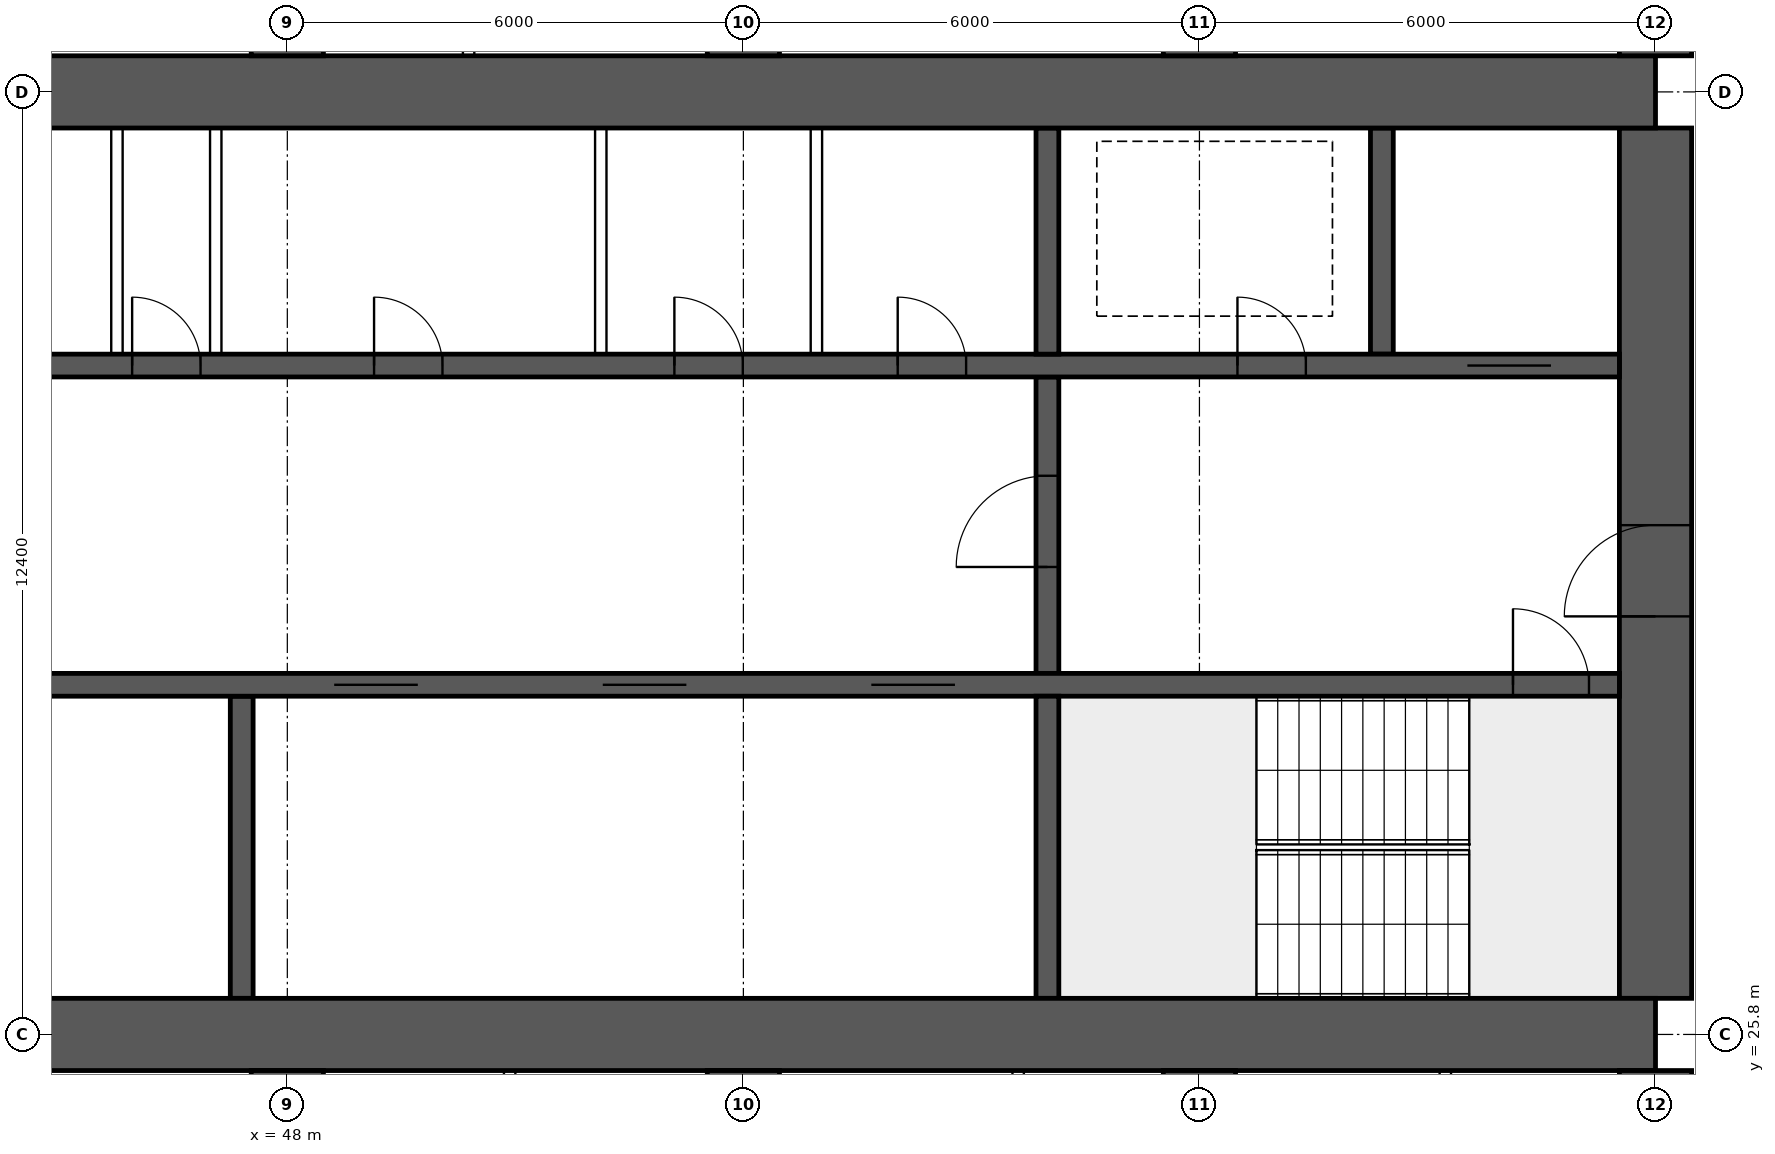
"""IFC4 building model, lengths in metres.
Left out: names, types, materials, properties, quantities, classifications, styles, units other than length and angle.
Written with IfcOpenShell. Run it as: python <this file> out.ifc"""

import sys

from ifc_helpers import new_model, si_unit, direction, frame, frame_2d, origin, place, context, subcontext, project, spatial, rectangle, extrude, element, fill, save


model = new_model("IFC4")
c1 = context("Model", 3, precision=1e-05, world=origin(), true_north=direction((0.0, 1.0)))
c2 = subcontext(c1, "Body", "Model", "MODEL_VIEW")
j1 = project(units=[si_unit("LENGTHUNIT", "METRE"), si_unit("PLANEANGLEUNIT", "RADIAN")], contexts=[c1])
p1 = place(None, origin())
s1 = spatial("IfcSite", under=j1, at=p1, CompositionType="ELEMENT")
p2 = place(p1, origin())
s2 = spatial("IfcBuilding", under=s1, at=p2, CompositionType="ELEMENT")
p3 = place(p2, frame((0.0, 0.0, 91.9)))
s3 = spatial("IfcBuildingStorey", under=s2, at=p3, CompositionType="ELEMENT", Elevation=91.9)
for number, where, z_axis, x_axis in (
    (1, (18.0, 25.8, 0.0), (0.0, 0.0, 1.0), (1.0, 0.0, 0.0)),
    (2, (18.0, 38.2, 0.0), (0.0, 0.0, 1.0), (1.0, 0.0, 0.0)),
):
    element("IfcWall", number, at=place(p3, frame(where, z_axis=z_axis, x_axis=x_axis)), inside=s3, PredefinedType="SHEAR", context=c2, shape_type="SweptSolid", body=[
        extrude(rectangle(XDim=48.0, YDim=0.95, at=frame_2d((24.0, 0.0))), origin(), (0.0, 0.0, 1.0), 3.75),
    ])
p4 = place(p3, frame((66.0, 26.275, 0.0), z_axis=(0.0, 0.0, 1.0), x_axis=(0.0, 1.0, 0.0)))
e3 = element("IfcWall", 3, at=p4, inside=s3, PredefinedType="SHEAR", context=c2, shape_type="SweptSolid", body=[
    extrude(rectangle(XDim=11.45, YDim=0.95, at=frame_2d((5.725, 0.0))), origin(), (0.0, 0.0, 1.0), 3.75),
])
p5 = place(p4, frame((5.025, 0.0, 0.0)))
e4 = element("IfcOpeningElement", 4, at=p5, cuts=e3, PredefinedType="OPENING", context=c2, shape_type="SweptSolid", body=[
    extrude(rectangle(XDim=1.2, YDim=2.1, at=frame_2d((0.6, 1.05))), frame((0.0, 0.485, 0.0), z_axis=(0.0, -1.0, 0.0), x_axis=(1.0, 0.0, 0.0)), (0.0, 0.0, 1.0), 0.97),
])
p6 = place(p3, frame((18.475, 30.4, 0.0), z_axis=(0.0, 0.0, 1.0), x_axis=(1.0, 0.0, 0.0)))
e5 = element("IfcWall", 5, at=p6, inside=s3, PredefinedType="SHEAR", context=c2, shape_type="SweptSolid", body=[
    extrude(rectangle(XDim=47.05, YDim=0.3, at=frame_2d((23.525, 0.0))), origin(), (0.0, 0.0, 1.0), 3.75),
])
p7 = place(p6, frame((0.4, 0.0, 0.0)))
e6 = element("IfcOpeningElement", 6, at=p7, cuts=e5, PredefinedType="OPENING", context=c2, shape_type="SweptSolid", body=[
    extrude(rectangle(XDim=1.0, YDim=2.1, at=frame_2d((0.5, 1.05))), frame((0.0, 0.16, 0.0), z_axis=(0.0, -1.0, 0.0), x_axis=(1.0, 0.0, 0.0)), (0.0, 0.0, 1.0), 0.32),
])
p8 = place(p6, frame((45.65, 0.0, 0.0)))
e7 = element("IfcOpeningElement", 7, at=p8, cuts=e5, PredefinedType="OPENING", context=c2, shape_type="SweptSolid", body=[
    extrude(rectangle(XDim=1.0, YDim=2.1, at=frame_2d((0.5, 1.05))), frame((0.0, 0.16, 0.0), z_axis=(0.0, -1.0, 0.0), x_axis=(1.0, 0.0, 0.0)), (0.0, 0.0, 1.0), 0.32),
])
p9 = place(p6, frame((8.275, 0.0, 0.0)))
e8 = element("IfcOpeningElement", 8, at=p9, cuts=e5, PredefinedType="OPENING", context=c2, shape_type="SweptSolid", body=[
    extrude(rectangle(XDim=1.1, YDim=2.1, at=frame_2d((0.55, 1.05))), frame((0.0, 0.16, 0.0), z_axis=(0.0, -1.0, 0.0), x_axis=(1.0, 0.0, 0.0)), (0.0, 0.0, 1.0), 0.32),
])
p10 = place(p6, frame((10.875, 0.0, 0.0)))
e9 = element("IfcOpeningElement", 9, at=p10, cuts=e5, PredefinedType="OPENING", context=c2, shape_type="SweptSolid", body=[
    extrude(rectangle(XDim=1.1, YDim=2.1, at=frame_2d((0.55, 1.05))), frame((0.0, 0.16, 0.0), z_axis=(0.0, -1.0, 0.0), x_axis=(1.0, 0.0, 0.0)), (0.0, 0.0, 1.0), 0.32),
])
p11 = place(p6, frame((13.475, 0.0, 0.0)))
e10 = element("IfcOpeningElement", 10, at=p11, cuts=e5, PredefinedType="OPENING", context=c2, shape_type="SweptSolid", body=[
    extrude(rectangle(XDim=1.1, YDim=2.1, at=frame_2d((0.55, 1.05))), frame((0.0, 0.16, 0.0), z_axis=(0.0, -1.0, 0.0), x_axis=(1.0, 0.0, 0.0)), (0.0, 0.0, 1.0), 0.32),
])
p12 = place(p6, frame((16.075, 0.0, 0.0)))
e11 = element("IfcOpeningElement", 11, at=p12, cuts=e5, PredefinedType="OPENING", context=c2, shape_type="SweptSolid", body=[
    extrude(rectangle(XDim=1.1, YDim=2.1, at=frame_2d((0.55, 1.05))), frame((0.0, 0.16, 0.0), z_axis=(0.0, -1.0, 0.0), x_axis=(1.0, 0.0, 0.0)), (0.0, 0.0, 1.0), 0.32),
])
p13 = place(p6, frame((18.85, 0.0, 0.0)))
e12 = element("IfcOpeningElement", 12, at=p13, cuts=e5, PredefinedType="OPENING", context=c2, shape_type="SweptSolid", body=[
    extrude(rectangle(XDim=0.9, YDim=2.1, at=frame_2d((0.45, 1.05))), frame((0.0, 0.16, 0.0), z_axis=(0.0, -1.0, 0.0), x_axis=(1.0, 0.0, 0.0)), (0.0, 0.0, 1.0), 0.32),
])
p14 = place(p6, frame((30.142, 0.0, 0.0)))
e13 = element("IfcOpeningElement", 13, at=p14, cuts=e5, PredefinedType="OPENING", context=c2, shape_type="SweptSolid", body=[
    extrude(rectangle(XDim=1.1, YDim=2.1, at=frame_2d((0.55, 1.05))), frame((0.0, 0.16, 0.0), z_axis=(0.0, -1.0, 0.0), x_axis=(1.0, 0.0, 0.0)), (0.0, 0.0, 1.0), 0.32),
])
p15 = place(p6, frame((33.675, 0.0, 0.0)))
e14 = element("IfcOpeningElement", 14, at=p15, cuts=e5, PredefinedType="OPENING", context=c2, shape_type="SweptSolid", body=[
    extrude(rectangle(XDim=1.1, YDim=2.1, at=frame_2d((0.55, 1.05))), frame((0.0, 0.16, 0.0), z_axis=(0.0, -1.0, 0.0), x_axis=(1.0, 0.0, 0.0)), (0.0, 0.0, 1.0), 0.32),
])
p16 = place(p6, frame((37.208, 0.0, 0.0)))
e15 = element("IfcOpeningElement", 15, at=p16, cuts=e5, PredefinedType="OPENING", context=c2, shape_type="SweptSolid", body=[
    extrude(rectangle(XDim=1.1, YDim=2.1, at=frame_2d((0.55, 1.05))), frame((0.0, 0.16, 0.0), z_axis=(0.0, -1.0, 0.0), x_axis=(1.0, 0.0, 0.0)), (0.0, 0.0, 1.0), 0.32),
])
p17 = place(p3, frame((18.475, 34.6, 0.0), z_axis=(0.0, 0.0, 1.0), x_axis=(1.0, 0.0, 0.0)))
e16 = element("IfcWall", 16, at=p17, inside=s3, PredefinedType="SHEAR", context=c2, shape_type="SweptSolid", body=[
    extrude(rectangle(XDim=47.05, YDim=0.3, at=frame_2d((23.525, 0.0))), origin(), (0.0, 0.0, 1.0), 3.75),
])
p18 = place(p17, frame((0.9, 0.0, 0.0)))
e17 = element("IfcOpeningElement", 17, at=p18, cuts=e16, PredefinedType="OPENING", context=c2, shape_type="SweptSolid", body=[
    extrude(rectangle(XDim=1.1, YDim=2.1, at=frame_2d((0.55, 1.05))), frame((0.0, 0.16, 0.0), z_axis=(0.0, -1.0, 0.0), x_axis=(1.0, 0.0, 0.0)), (0.0, 0.0, 1.0), 0.32),
])
p19 = place(p17, frame((45.05, 0.0, 0.0)))
e18 = element("IfcOpeningElement", 18, at=p19, cuts=e16, PredefinedType="OPENING", context=c2, shape_type="SweptSolid", body=[
    extrude(rectangle(XDim=1.1, YDim=2.1, at=frame_2d((0.55, 1.05))), frame((0.0, 0.16, 0.0), z_axis=(0.0, -1.0, 0.0), x_axis=(1.0, 0.0, 0.0)), (0.0, 0.0, 1.0), 0.32),
])
p20 = place(p17, frame((4.125, 0.0, 0.0)))
e19 = element("IfcOpeningElement", 19, at=p20, cuts=e16, PredefinedType="OPENING", context=c2, shape_type="SweptSolid", body=[
    extrude(rectangle(XDim=0.9, YDim=2.1, at=frame_2d((0.45, 1.05))), frame((0.0, 0.16, 0.0), z_axis=(0.0, -1.0, 0.0), x_axis=(1.0, 0.0, 0.0)), (0.0, 0.0, 1.0), 0.32),
])
p21 = place(p17, frame((42.025, 0.0, 0.0)))
e20 = element("IfcOpeningElement", 20, at=p21, cuts=e16, PredefinedType="OPENING", context=c2, shape_type="SweptSolid", body=[
    extrude(rectangle(XDim=0.9, YDim=2.1, at=frame_2d((0.45, 1.05))), frame((0.0, 0.16, 0.0), z_axis=(0.0, -1.0, 0.0), x_axis=(1.0, 0.0, 0.0)), (0.0, 0.0, 1.0), 0.32),
])
p22 = place(p17, frame((8.9, 0.0, 0.0)))
e21 = element("IfcOpeningElement", 21, at=p22, cuts=e16, PredefinedType="OPENING", context=c2, shape_type="SweptSolid", body=[
    extrude(rectangle(XDim=0.9, YDim=2.1, at=frame_2d((0.45, 1.05))), frame((0.0, 0.16, 0.0), z_axis=(0.0, -1.0, 0.0), x_axis=(1.0, 0.0, 0.0)), (0.0, 0.0, 1.0), 0.32),
])
p23 = place(p17, frame((12.874, 0.0, 0.0)))
e22 = element("IfcOpeningElement", 22, at=p23, cuts=e16, PredefinedType="OPENING", context=c2, shape_type="SweptSolid", body=[
    extrude(rectangle(XDim=0.9, YDim=2.1, at=frame_2d((0.45, 1.05))), frame((0.0, 0.16, 0.0), z_axis=(0.0, -1.0, 0.0), x_axis=(1.0, 0.0, 0.0)), (0.0, 0.0, 1.0), 0.32),
])
p24 = place(p17, frame((16.521, 0.0, 0.0)))
e23 = element("IfcOpeningElement", 23, at=p24, cuts=e16, PredefinedType="OPENING", context=c2, shape_type="SweptSolid", body=[
    extrude(rectangle(XDim=0.9, YDim=2.1, at=frame_2d((0.45, 1.05))), frame((0.0, 0.16, 0.0), z_axis=(0.0, -1.0, 0.0), x_axis=(1.0, 0.0, 0.0)), (0.0, 0.0, 1.0), 0.32),
])
p25 = place(p17, frame((20.28, 0.0, 0.0)))
e24 = element("IfcOpeningElement", 24, at=p25, cuts=e16, PredefinedType="OPENING", context=c2, shape_type="SweptSolid", body=[
    extrude(rectangle(XDim=0.9, YDim=2.1, at=frame_2d((0.45, 1.05))), frame((0.0, 0.16, 0.0), z_axis=(0.0, -1.0, 0.0), x_axis=(1.0, 0.0, 0.0)), (0.0, 0.0, 1.0), 0.32),
])
p26 = place(p17, frame((24.686, 0.0, 0.0)))
e25 = element("IfcOpeningElement", 25, at=p26, cuts=e16, PredefinedType="OPENING", context=c2, shape_type="SweptSolid", body=[
    extrude(rectangle(XDim=0.9, YDim=2.1, at=frame_2d((0.45, 1.05))), frame((0.0, 0.16, 0.0), z_axis=(0.0, -1.0, 0.0), x_axis=(1.0, 0.0, 0.0)), (0.0, 0.0, 1.0), 0.32),
])
p27 = place(p17, frame((27.483, 0.0, 0.0)))
e26 = element("IfcOpeningElement", 26, at=p27, cuts=e16, PredefinedType="OPENING", context=c2, shape_type="SweptSolid", body=[
    extrude(rectangle(XDim=0.9, YDim=2.1, at=frame_2d((0.45, 1.05))), frame((0.0, 0.16, 0.0), z_axis=(0.0, -1.0, 0.0), x_axis=(1.0, 0.0, 0.0)), (0.0, 0.0, 1.0), 0.32),
])
p28 = place(p17, frame((30.666, 0.0, 0.0)))
e27 = element("IfcOpeningElement", 27, at=p28, cuts=e16, PredefinedType="OPENING", context=c2, shape_type="SweptSolid", body=[
    extrude(rectangle(XDim=0.9, YDim=2.1, at=frame_2d((0.45, 1.05))), frame((0.0, 0.16, 0.0), z_axis=(0.0, -1.0, 0.0), x_axis=(1.0, 0.0, 0.0)), (0.0, 0.0, 1.0), 0.32),
])
p29 = place(p17, frame((34.617, 0.0, 0.0)))
e28 = element("IfcOpeningElement", 28, at=p29, cuts=e16, PredefinedType="OPENING", context=c2, shape_type="SweptSolid", body=[
    extrude(rectangle(XDim=0.9, YDim=2.1, at=frame_2d((0.45, 1.05))), frame((0.0, 0.16, 0.0), z_axis=(0.0, -1.0, 0.0), x_axis=(1.0, 0.0, 0.0)), (0.0, 0.0, 1.0), 0.32),
])
p30 = place(p17, frame((37.555, 0.0, 0.0)))
e29 = element("IfcOpeningElement", 29, at=p30, cuts=e16, PredefinedType="OPENING", context=c2, shape_type="SweptSolid", body=[
    extrude(rectangle(XDim=0.9, YDim=2.1, at=frame_2d((0.45, 1.05))), frame((0.0, 0.16, 0.0), z_axis=(0.0, -1.0, 0.0), x_axis=(1.0, 0.0, 0.0)), (0.0, 0.0, 1.0), 0.32),
])
p31 = place(p3, frame((58.0, 26.275, 0.0), z_axis=(0.0, 0.0, 1.0), x_axis=(0.0, 1.0, 0.0)))
e30 = element("IfcWall", 30, at=p31, inside=s3, PredefinedType="SHEAR", context=c2, shape_type="SweptSolid", body=[
    extrude(rectangle(XDim=3.975, YDim=0.3, at=frame_2d((1.988, 0.0))), origin(), (0.0, 0.0, 1.0), 3.75),
])
p32 = place(p3, frame((58.0, 30.55, 0.0), z_axis=(0.0, 0.0, 1.0), x_axis=(0.0, 1.0, 0.0)))
e31 = element("IfcWall", 31, at=p32, inside=s3, PredefinedType="SHEAR", context=c2, shape_type="SweptSolid", body=[
    extrude(rectangle(XDim=3.9, YDim=0.3, at=frame_2d((1.95, 0.0))), origin(), (0.0, 0.0, 1.0), 3.75),
])
p33 = place(p32, frame((1.4, 0.0, 0.0)))
e32 = element("IfcOpeningElement", 32, at=p33, cuts=e31, PredefinedType="OPENING", context=c2, shape_type="SweptSolid", body=[
    extrude(rectangle(XDim=1.2, YDim=2.1, at=frame_2d((0.6, 1.05))), frame((0.0, 0.16, 0.0), z_axis=(0.0, -1.0, 0.0), x_axis=(1.0, 0.0, 0.0)), (0.0, 0.0, 1.0), 0.32),
])
for number, where, z_axis, x_axis in (
    (33, (62.4, 34.75, 0.0), (0.0, 0.0, 1.0), (0.0, 1.0, 0.0)),
    (34, (58.0, 34.75, 0.0), (0.0, 0.0, 1.0), (0.0, 1.0, 0.0)),
):
    element("IfcWall", number, at=place(p3, frame(where, z_axis=z_axis, x_axis=x_axis)), inside=s3, PredefinedType="SHEAR", context=c2, shape_type="SweptSolid", body=[
        extrude(rectangle(XDim=2.975, YDim=0.3, at=frame_2d((1.488, 0.0))), origin(), (0.0, 0.0, 1.0), 3.75),
    ])
p34 = place(p3, frame((47.4, 26.275, 0.0), z_axis=(0.0, 0.0, 1.0), x_axis=(0.0, 1.0, 0.0)))
e35 = element("IfcWall", 35, at=p34, inside=s3, PredefinedType="SHEAR", context=c2, shape_type="SweptSolid", body=[
    extrude(rectangle(XDim=3.975, YDim=0.3, at=frame_2d((1.988, 0.0))), origin(), (0.0, 0.0, 1.0), 3.75),
])
for number, where, z_axis, x_axis in (
    (36, (48.0, 16.0, 0.0), (0.0, 0.0, 1.0), (0.0, 1.0, 0.0)),
    (37, (48.0, 38.675, 0.0), (0.0, 0.0, 1.0), (0.0, 1.0, 0.0)),
    (38, (54.0, 16.0, 0.0), (0.0, 0.0, 1.0), (0.0, 1.0, 0.0)),
    (39, (54.0, 38.675, 0.0), (0.0, 0.0, 1.0), (0.0, 1.0, 0.0)),
    (40, (60.0, 16.0, 0.0), (0.0, 0.0, 1.0), (0.0, 1.0, 0.0)),
    (41, (60.0, 38.675, 0.0), (0.0, 0.0, 1.0), (0.0, 1.0, 0.0)),
    (42, (66.0, 16.0, 0.0), (0.0, 0.0, 1.0), (0.0, 1.0, 0.0)),
    (43, (66.0, 38.675, 0.0), (0.0, 0.0, 1.0), (0.0, 1.0, 0.0)),
):
    element("IfcWall", number, at=place(p3, frame(where, z_axis=z_axis, x_axis=x_axis)), inside=s3, PredefinedType="SHEAR", context=c2, shape_type="SweptSolid", body=[
        extrude(rectangle(XDim=9.325, YDim=0.95, at=frame_2d((4.663, 0.0))), origin(), (0.0, 0.0, 1.0), 3.75),
    ])
for number, where, z_axis, x_axis in (
    (44, (45.758, 34.75, 0.0), (0.0, 0.0, 1.0), (0.0, 1.0, 0.0)),
    (45, (47.058, 34.75, 0.0), (0.0, 0.0, 1.0), (0.0, 1.0, 0.0)),
    (46, (52.124, 34.75, 0.0), (0.0, 0.0, 1.0), (0.0, 1.0, 0.0)),
    (47, (54.961, 34.75, 0.0), (0.0, 0.0, 1.0), (0.0, 1.0, 0.0)),
):
    element("IfcWall", number, at=place(p3, frame(where, z_axis=z_axis, x_axis=x_axis)), inside=s3, PredefinedType="SOLIDWALL", context=c2, shape_type="SweptSolid", body=[
        extrude(rectangle(XDim=2.975, YDim=0.15, at=frame_2d((1.488, 0.0))), origin(), (0.0, 0.0, 1.0), 3.5),
    ])
for number, where, z_axis, x_axis in (
    (48, (50.925, 16.1, 0.0), (0.0, 0.0, 1.0), (0.0, 1.0, 0.0)),
    (49, (57.615, 16.1, 0.0), (0.0, 0.0, 1.0), (0.0, 1.0, 0.0)),
    (50, (63.235, 16.1, 0.0), (0.0, 0.0, 1.0), (0.0, 1.0, 0.0)),
    (51, (50.385, 38.675, 0.0), (0.0, 0.0, 1.0), (0.0, 1.0, 0.0)),
):
    element("IfcWall", number, at=place(p3, frame(where, z_axis=z_axis, x_axis=x_axis)), inside=s3, PredefinedType="PARTITIONING", context=c2, shape_type="SweptSolid", body=[
        extrude(rectangle(XDim=9.225, YDim=0.15, at=frame_2d((4.612, 0.0))), origin(), (0.0, 0.0, 1.0), 3.5),
    ])
p35 = place(p5, origin())
e52 = element("IfcDoor", 52, at=p35, inside=s3, OperationType="SINGLE_SWING_LEFT", PredefinedType="DOOR", context=c2, shape_type="SweptSolid", body=[
    extrude(rectangle(XDim=1.2, YDim=2.1, at=frame_2d((0.6, 1.05))), frame((0.0, 0.025, 0.0), z_axis=(0.0, -1.0, 0.0), x_axis=(1.0, 0.0, 0.0)), (0.0, 0.0, 1.0), 0.05),
])
fill(e4, e52)
p36 = place(p8, origin())
e53 = element("IfcDoor", 53, at=p36, inside=s3, OperationType="SINGLE_SWING_LEFT", PredefinedType="DOOR", context=c2, shape_type="SweptSolid", body=[
    extrude(rectangle(XDim=1.0, YDim=2.1, at=frame_2d((0.5, 1.05))), frame((0.0, 0.025, 0.0), z_axis=(0.0, -1.0, 0.0), x_axis=(1.0, 0.0, 0.0)), (0.0, 0.0, 1.0), 0.05),
])
fill(e7, e53)
p37 = place(p19, origin())
e54 = element("IfcDoor", 54, at=p37, inside=s3, OperationType="DOUBLE_DOOR_SLIDING", PredefinedType="DOOR", context=c2, shape_type="SweptSolid", body=[
    extrude(rectangle(XDim=1.1, YDim=2.1, at=frame_2d((0.55, 1.05))), frame((0.0, 0.025, 0.0), z_axis=(0.0, -1.0, 0.0), x_axis=(1.0, 0.0, 0.0)), (0.0, 0.0, 1.0), 0.05),
])
fill(e18, e54)
p38 = place(p21, origin())
e55 = element("IfcDoor", 55, at=p38, inside=s3, OperationType="SINGLE_SWING_LEFT", PredefinedType="DOOR", context=c2, shape_type="SweptSolid", body=[
    extrude(rectangle(XDim=0.9, YDim=2.1, at=frame_2d((0.45, 1.05))), frame((0.0, 0.025, 0.0), z_axis=(0.0, -1.0, 0.0), x_axis=(1.0, 0.0, 0.0)), (0.0, 0.0, 1.0), 0.05),
])
fill(e20, e55)
p39 = place(p33, origin())
e56 = element("IfcDoor", 56, at=p39, inside=s3, OperationType="SINGLE_SWING_LEFT", PredefinedType="DOOR", context=c2, shape_type="SweptSolid", body=[
    extrude(rectangle(XDim=1.2, YDim=2.1, at=frame_2d((0.6, 1.05))), frame((0.0, 0.025, 0.0), z_axis=(0.0, -1.0, 0.0), x_axis=(1.0, 0.0, 0.0)), (0.0, 0.0, 1.0), 0.05),
])
fill(e32, e56)
p40 = place(p27, origin())
e57 = element("IfcDoor", 57, at=p40, inside=s3, OperationType="SINGLE_SWING_LEFT", PredefinedType="DOOR", context=c2, shape_type="SweptSolid", body=[
    extrude(rectangle(XDim=0.9, YDim=2.1, at=frame_2d((0.45, 1.05))), frame((0.0, 0.025, 0.0), z_axis=(0.0, -1.0, 0.0), x_axis=(1.0, 0.0, 0.0)), (0.0, 0.0, 1.0), 0.05),
])
fill(e26, e57)
p41 = place(p28, origin())
e58 = element("IfcDoor", 58, at=p41, inside=s3, OperationType="SINGLE_SWING_LEFT", PredefinedType="DOOR", context=c2, shape_type="SweptSolid", body=[
    extrude(rectangle(XDim=0.9, YDim=2.1, at=frame_2d((0.45, 1.05))), frame((0.0, 0.025, 0.0), z_axis=(0.0, -1.0, 0.0), x_axis=(1.0, 0.0, 0.0)), (0.0, 0.0, 1.0), 0.05),
])
fill(e27, e58)
p42 = place(p29, origin())
e59 = element("IfcDoor", 59, at=p42, inside=s3, OperationType="SINGLE_SWING_LEFT", PredefinedType="DOOR", context=c2, shape_type="SweptSolid", body=[
    extrude(rectangle(XDim=0.9, YDim=2.1, at=frame_2d((0.45, 1.05))), frame((0.0, 0.025, 0.0), z_axis=(0.0, -1.0, 0.0), x_axis=(1.0, 0.0, 0.0)), (0.0, 0.0, 1.0), 0.05),
])
fill(e28, e59)
p43 = place(p30, origin())
e60 = element("IfcDoor", 60, at=p43, inside=s3, OperationType="SINGLE_SWING_LEFT", PredefinedType="DOOR", context=c2, shape_type="SweptSolid", body=[
    extrude(rectangle(XDim=0.9, YDim=2.1, at=frame_2d((0.45, 1.05))), frame((0.0, 0.025, 0.0), z_axis=(0.0, -1.0, 0.0), x_axis=(1.0, 0.0, 0.0)), (0.0, 0.0, 1.0), 0.05),
])
fill(e29, e60)
p44 = place(p14, origin())
e61 = element("IfcDoor", 61, at=p44, inside=s3, OperationType="DOUBLE_DOOR_SLIDING", PredefinedType="DOOR", context=c2, shape_type="SweptSolid", body=[
    extrude(rectangle(XDim=1.1, YDim=2.1, at=frame_2d((0.55, 1.05))), frame((0.0, 0.025, 0.0), z_axis=(0.0, -1.0, 0.0), x_axis=(1.0, 0.0, 0.0)), (0.0, 0.0, 1.0), 0.05),
])
fill(e13, e61)
p45 = place(p15, origin())
e62 = element("IfcDoor", 62, at=p45, inside=s3, OperationType="DOUBLE_DOOR_SLIDING", PredefinedType="DOOR", context=c2, shape_type="SweptSolid", body=[
    extrude(rectangle(XDim=1.1, YDim=2.1, at=frame_2d((0.55, 1.05))), frame((0.0, 0.025, 0.0), z_axis=(0.0, -1.0, 0.0), x_axis=(1.0, 0.0, 0.0)), (0.0, 0.0, 1.0), 0.05),
])
fill(e14, e62)
p46 = place(p16, origin())
e63 = element("IfcDoor", 63, at=p46, inside=s3, OperationType="DOUBLE_DOOR_SLIDING", PredefinedType="DOOR", context=c2, shape_type="SweptSolid", body=[
    extrude(rectangle(XDim=1.1, YDim=2.1, at=frame_2d((0.55, 1.05))), frame((0.0, 0.025, 0.0), z_axis=(0.0, -1.0, 0.0), x_axis=(1.0, 0.0, 0.0)), (0.0, 0.0, 1.0), 0.05),
])
fill(e15, e63)
save(model, sys.argv[1])
